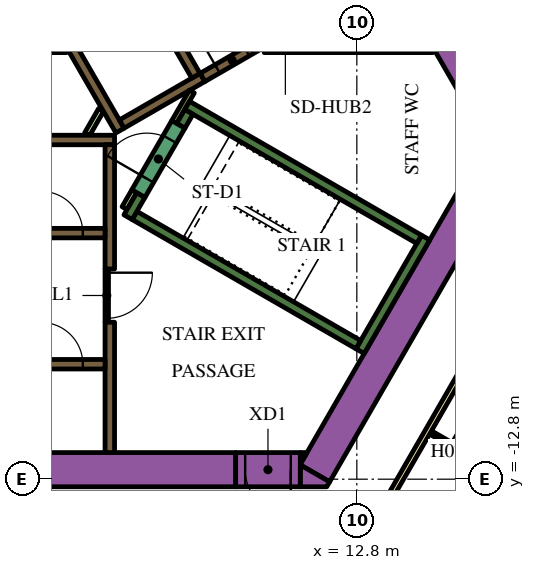
"""IFC4 building model, lengths in metres.
Left out: names, types, materials, properties, quantities, classifications, styles, units other than length and angle.
Written with IfcOpenShell. Run it as: python <this file> out.ifc"""

import sys

from ifc_helpers import new_model, si_unit, direction, frame, frame_2d, origin, place, context, subcontext, project, spatial, polyline, rectangle, outline, extrude, element, fill, save


model = new_model("IFC4")
c1 = context("Model", 3, precision=1e-05, world=origin(), true_north=direction((0.0, 1.0)))
c2 = subcontext(c1, "Body", "Model", "MODEL_VIEW")
j1 = project(units=[si_unit("LENGTHUNIT", "METRE"), si_unit("PLANEANGLEUNIT", "RADIAN")], contexts=[c1])
p1 = place(None, origin())
s1 = spatial("IfcSite", under=j1, at=p1, CompositionType="ELEMENT")
p2 = place(p1, origin())
s2 = spatial("IfcBuilding", under=s1, at=p2, CompositionType="ELEMENT")
p3 = place(p2, frame((0.0, 0.0, 95.4)))
s3 = spatial("IfcBuildingStorey", under=s2, at=p3, CompositionType="ELEMENT", Elevation=95.4)
p4 = place(p3, frame((6.776, 13.364, 0.0), z_axis=(0.0, 0.0, 1.0), x_axis=(0.500004177138, -0.8660229921, 0.0)))
e1 = element("IfcWall", 1, at=p4, inside=s3, PredefinedType="SOLIDWALL", context=c2, shape_type="SweptSolid", body=[
    extrude(rectangle(XDim=20.204, YDim=0.9, at=frame_2d((10.102, 0.0))), origin(), (0.0, 0.0, 1.0), 3.9),
])
p5 = place(p3, frame((11.695, -12.644, 0.0), z_axis=(0.0, 0.0, 1.0), x_axis=(0.500010229568, 0.86601949766, 0.0)))
e2 = element("IfcWall", 2, at=p5, inside=s3, PredefinedType="SOLIDWALL", context=c2, shape_type="SweptSolid", body=[
    extrude(rectangle(XDim=9.326, YDim=0.9, at=frame_2d((4.663, 0.0))), origin(), (0.0, 0.0, 1.0), 3.9),
])
p6 = place(p3, origin())
e3 = element("IfcWall", 3, at=p6, inside=s3, PredefinedType="SOLIDWALL", context=c2, shape_type="SweptSolid", body=[
    extrude(outline(polyline([(12.009, -13.0), (11.312, -13.0), (11.312, -12.425), (12.083, -12.871), (12.009, -13.0)])), origin(), (0.0, 0.0, 1.0), 3.9),
])
e4 = element("IfcWall", 4, at=p6, inside=s3, PredefinedType="SOLIDWALL", context=c2, shape_type="SweptSolid", body=[
    extrude(outline(polyline([(11.489, -12.1), (11.312, -12.407), (11.312, -12.1), (11.489, -12.1)])), origin(), (0.0, 0.0, 1.0), 3.9),
])
p7 = place(p3, frame((-12.019, -12.55, 0.0), z_axis=(0.0, 0.0, 1.0), x_axis=(1.0, 0.0, 0.0)))
e5 = element("IfcWall", 5, at=p7, inside=s3, PredefinedType="SOLIDWALL", context=c2, shape_type="SweptSolid", body=[
    extrude(rectangle(XDim=21.63, YDim=0.9, at=frame_2d((10.815, 0.0))), origin(), (0.0, 0.0, 1.0), 3.9),
])
p8 = place(p3, frame((12.885, -9.431, 0.0), z_axis=(0.0, 0.0, 1.0), x_axis=(0.500020560727, 0.866013532718, 0.0)))
e6 = element("IfcWall", 6, at=p8, inside=s3, PredefinedType="SOLIDWALL", context=c2, shape_type="SweptSolid", body=[
    extrude(rectangle(XDim=3.45, YDim=0.25, at=frame_2d((1.725, 0.0))), origin(), (0.0, 0.0, 1.0), 3.9),
])
p9 = place(p3, frame((12.84, -9.261, 0.0), z_axis=(0.0, 0.0, 1.0), x_axis=(-0.866013990052, 0.500019768644, 0.0)))
e7 = element("IfcWall", 7, at=p9, inside=s3, PredefinedType="SOLIDWALL", context=c2, shape_type="SweptSolid", body=[
    extrude(rectangle(XDim=6.8, YDim=0.25, at=frame_2d((3.4, 0.0))), origin(), (0.0, 0.0, 1.0), 3.9),
])
p10 = place(p3, frame((6.78, -5.906, 0.0), z_axis=(0.0, 0.0, 1.0), x_axis=(0.500223362819, 0.865896406789, 0.0)))
e8 = element("IfcWall", 8, at=p10, inside=s3, PredefinedType="SOLIDWALL", context=c2, shape_type="SweptSolid", body=[
    extrude(rectangle(XDim=0.675, YDim=0.25, at=frame_2d((0.337, 0.0))), origin(), (0.0, 0.0, 1.0), 3.9),
])
p11 = place(p3, frame((8.334, -2.964, 0.0), z_axis=(0.0, 0.0, 1.0), x_axis=(0.866016039709, -0.500016218704, 0.0)))
e9 = element("IfcWall", 9, at=p11, inside=s3, PredefinedType="SOLIDWALL", context=c2, shape_type="SweptSolid", body=[
    extrude(rectangle(XDim=7.05, YDim=0.25, at=frame_2d((3.525, 0.0))), origin(), (0.0, 0.0, 1.0), 3.9),
])
p12 = place(p3, frame((8.168, -3.503, 0.0), z_axis=(0.0, 0.0, 1.0), x_axis=(0.49972245349, 0.866185586049, 0.0)))
e10 = element("IfcWall", 10, at=p12, inside=s3, PredefinedType="SOLIDWALL", context=c2, shape_type="SweptSolid", body=[
    extrude(rectangle(XDim=0.425, YDim=0.25, at=frame_2d((0.212, 0.0))), origin(), (0.0, 0.0, 1.0), 3.9),
])
p13 = place(p3, frame((-5.545, -3.875, 0.0), z_axis=(0.0, 0.0, 1.0), x_axis=(1.0, 0.0, 0.0)))
e11 = element("IfcWall", 11, at=p13, inside=s3, PredefinedType="SOLIDWALL", context=c2, shape_type="SweptSolid", body=[
    extrude(rectangle(XDim=11.97, YDim=0.25, at=frame_2d((5.985, 0.0))), origin(), (0.0, 0.0, 1.0), 3.9),
])
p14 = place(p3, frame((6.3, -8.67, 0.0), z_axis=(0.0, 0.0, 1.0), x_axis=(0.0, -1.0, 0.0)))
e12 = element("IfcWall", 12, at=p14, inside=s3, PredefinedType="SOLIDWALL", context=c2, shape_type="SweptSolid", body=[
    extrude(rectangle(XDim=3.43, YDim=0.25, at=frame_2d((1.715, 0.0))), origin(), (0.0, 0.0, 1.0), 3.9),
])
p15 = place(p3, frame((6.3, -7.268, 0.0), z_axis=(0.0, 0.0, 1.0), x_axis=(0.0, 1.0, 0.0)))
e13 = element("IfcWall", 13, at=p15, inside=s3, PredefinedType="SOLIDWALL", context=c2, shape_type="SweptSolid", body=[
    extrude(rectangle(XDim=3.268, YDim=0.25, at=frame_2d((1.634, 0.0))), origin(), (0.0, 0.0, 1.0), 3.9),
])
e14 = element("IfcWall", 14, at=p6, inside=s3, PredefinedType="SOLIDWALL", context=c2, shape_type="SweptSolid", body=[
    extrude(outline(polyline([(0.566, 6.725), (0.566, 6.875), (0.566, 6.875), (0.565, 6.875), (0.361, 6.875), (0.035, 7.439), (0.252, 7.564), (0.377, 7.348), (6.552, -3.348), (6.677, -3.564), (6.46, -3.689), (0.448, 6.725), (0.565, 6.725), (0.566, 6.725), (0.566, 6.725)])), origin(), (0.0, 0.0, 1.0), 3.9),
])
p16 = place(p3, frame((6.614, -3.456, 0.0), z_axis=(0.0, 0.0, 1.0), x_axis=(0.866031582473, 0.499989298045, 0.0)))
e15 = element("IfcWall", 15, at=p16, inside=s3, PredefinedType="SOLIDWALL", context=c2, shape_type="SweptSolid", body=[
    extrude(rectangle(XDim=2.455, YDim=0.25, at=frame_2d((1.228, 0.0))), origin(), (0.0, 0.0, 1.0), 3.9),
])
p17 = place(p3, frame((6.945, -5.222, 0.0), z_axis=(0.0, 0.0, 1.0), x_axis=(-0.499818422106, -0.866130212453, 0.0)))
e16 = element("IfcWall", 16, at=p17, inside=s3, PredefinedType="PARTITIONING", context=c2, shape_type="SweptSolid", body=[
    extrude(rectangle(XDim=0.514, YDim=0.15, at=frame_2d((0.257, 0.0))), origin(), (0.0, 0.0, 1.0), 2.75),
])
p18 = place(p3, frame((5.705, -3.718, 0.0), z_axis=(0.0, 0.0, 1.0), x_axis=(0.499962090823, 0.866047289552, 0.0)))
e17 = element("IfcWall", 17, at=p18, inside=s3, PredefinedType="PARTITIONING", context=c2, shape_type="SweptSolid", body=[
    extrude(rectangle(XDim=0.735, YDim=0.15, at=frame_2d((0.367, 0.0))), origin(), (0.0, 0.0, 1.0), 2.75),
])
p19 = place(p3, frame((8.459, -2.599, 0.0), z_axis=(0.0, 0.0, 1.0), x_axis=(-0.500041054325, -0.866001699761, 0.0)))
e18 = element("IfcWall", 18, at=p19, inside=s3, PredefinedType="PARTITIONING", context=c2, shape_type="SweptSolid", body=[
    extrude(rectangle(XDim=0.929, YDim=0.15, at=frame_2d((0.464, 0.0))), origin(), (0.0, 0.0, 1.0), 3.9),
])
p20 = place(p3, frame((-6.175, -9.775, 0.0), z_axis=(0.0, 0.0, 1.0), x_axis=(1.0, 0.0, 0.0)))
e19 = element("IfcWall", 19, at=p20, inside=s3, PredefinedType="SOLIDWALL", context=c2, shape_type="SweptSolid", body=[
    extrude(rectangle(XDim=12.35, YDim=0.25, at=frame_2d((6.175, 0.0))), origin(), (0.0, 0.0, 1.0), 3.9),
])
p21 = place(p20, frame((0.585, 0.0, 0.0)))
e20 = element("IfcOpeningElement", 20, at=p21, cuts=e19, PredefinedType="OPENING", context=c2, shape_type="SweptSolid", body=[
    extrude(rectangle(XDim=1.1, YDim=2.1, at=frame_2d((0.55, 1.05))), frame((0.0, 0.135, 0.0), z_axis=(0.0, -1.0, 0.0), x_axis=(1.0, 0.0, 0.0)), (0.0, 0.0, 1.0), 0.27),
])
p22 = place(p20, frame((3.105, 0.0, 0.0)))
e21 = element("IfcOpeningElement", 21, at=p22, cuts=e19, PredefinedType="OPENING", context=c2, shape_type="SweptSolid", body=[
    extrude(rectangle(XDim=1.1, YDim=2.1, at=frame_2d((0.55, 1.05))), frame((0.0, 0.135, 0.0), z_axis=(0.0, -1.0, 0.0), x_axis=(1.0, 0.0, 0.0)), (0.0, 0.0, 1.0), 0.27),
])
p23 = place(p20, frame((5.625, 0.0, 0.0)))
e22 = element("IfcOpeningElement", 22, at=p23, cuts=e19, PredefinedType="OPENING", context=c2, shape_type="SweptSolid", body=[
    extrude(rectangle(XDim=1.1, YDim=2.1, at=frame_2d((0.55, 1.05))), frame((0.0, 0.135, 0.0), z_axis=(0.0, -1.0, 0.0), x_axis=(1.0, 0.0, 0.0)), (0.0, 0.0, 1.0), 0.27),
])
p24 = place(p20, frame((8.145, 0.0, 0.0)))
e23 = element("IfcOpeningElement", 23, at=p24, cuts=e19, PredefinedType="OPENING", context=c2, shape_type="SweptSolid", body=[
    extrude(rectangle(XDim=1.1, YDim=2.1, at=frame_2d((0.55, 1.05))), frame((0.0, 0.135, 0.0), z_axis=(0.0, -1.0, 0.0), x_axis=(1.0, 0.0, 0.0)), (0.0, 0.0, 1.0), 0.27),
])
p25 = place(p20, frame((10.665, 0.0, 0.0)))
e24 = element("IfcOpeningElement", 24, at=p25, cuts=e19, PredefinedType="OPENING", context=c2, shape_type="SweptSolid", body=[
    extrude(rectangle(XDim=1.1, YDim=2.1, at=frame_2d((0.55, 1.05))), frame((0.0, 0.135, 0.0), z_axis=(0.0, -1.0, 0.0), x_axis=(1.0, 0.0, 0.0)), (0.0, 0.0, 1.0), 0.27),
])
p26 = place(p3, frame((-6.175, -6.325, 0.0), z_axis=(0.0, 0.0, 1.0), x_axis=(1.0, 0.0, 0.0)))
e25 = element("IfcWall", 25, at=p26, inside=s3, PredefinedType="SOLIDWALL", context=c2, shape_type="SweptSolid", body=[
    extrude(rectangle(XDim=12.35, YDim=0.25, at=frame_2d((6.175, 0.0))), origin(), (0.0, 0.0, 1.0), 3.9),
])
p27 = place(p26, frame((3.205, 0.0, 0.0)))
e26 = element("IfcOpeningElement", 26, at=p27, cuts=e25, PredefinedType="OPENING", context=c2, shape_type="SweptSolid", body=[
    extrude(rectangle(XDim=0.9, YDim=2.1, at=frame_2d((0.45, 1.05))), frame((0.0, 0.135, 0.0), z_axis=(0.0, -1.0, 0.0), x_axis=(1.0, 0.0, 0.0)), (0.0, 0.0, 1.0), 0.27),
])
p28 = place(p26, frame((8.145, 0.0, 0.0)))
e27 = element("IfcOpeningElement", 27, at=p28, cuts=e25, PredefinedType="OPENING", context=c2, shape_type="SweptSolid", body=[
    extrude(rectangle(XDim=1.1, YDim=2.1, at=frame_2d((0.55, 1.05))), frame((0.0, 0.135, 0.0), z_axis=(0.0, -1.0, 0.0), x_axis=(1.0, 0.0, 0.0)), (0.0, 0.0, 1.0), 0.27),
])
p29 = place(p26, frame((10.665, 0.0, 0.0)))
e28 = element("IfcOpeningElement", 28, at=p29, cuts=e25, PredefinedType="OPENING", context=c2, shape_type="SweptSolid", body=[
    extrude(rectangle(XDim=1.1, YDim=2.1, at=frame_2d((0.55, 1.05))), frame((0.0, 0.135, 0.0), z_axis=(0.0, -1.0, 0.0), x_axis=(1.0, 0.0, 0.0)), (0.0, 0.0, 1.0), 0.27),
])
p30 = place(p3, frame((8.565, -2.185, 0.0), z_axis=(0.0, 0.0, 1.0), x_axis=(-0.499997954832, 0.866026584559, 0.0)))
e29 = element("IfcWall", 29, at=p30, inside=s3, PredefinedType="SOLIDWALL", context=c2, shape_type="SweptSolid", body=[
    extrude(rectangle(XDim=12.35, YDim=0.25, at=frame_2d((6.175, 0.0))), origin(), (0.0, 0.0, 1.0), 3.9),
])
p31 = place(p30, frame((5.725, 0.0, 0.0)))
e30 = element("IfcOpeningElement", 30, at=p31, cuts=e29, PredefinedType="OPENING", context=c2, shape_type="SweptSolid", body=[
    extrude(rectangle(XDim=0.9, YDim=2.1, at=frame_2d((0.45, 1.05))), frame((0.0, 0.135, 0.0), z_axis=(0.0, -1.0, 0.0), x_axis=(1.0, 0.0, 0.0)), (0.0, 0.0, 1.0), 0.27),
])
p32 = place(p3, frame((7.053, -5.284, 0.0), z_axis=(0.0, 0.0, 1.0), x_axis=(0.500078061341, 0.865980330357, 0.0)))
e31 = element("IfcWall", 31, at=p32, inside=s3, PredefinedType="SOLIDWALL", context=c2, shape_type="SweptSolid", body=[
    extrude(rectangle(XDim=2.1, YDim=0.4, at=frame_2d((1.05, 0.0))), origin(), (0.0, 0.0, 1.0), 3.9),
])
p33 = place(p32, frame((0.45, 0.0, 0.0)))
e32 = element("IfcOpeningElement", 32, at=p33, cuts=e31, PredefinedType="OPENING", context=c2, shape_type="SweptSolid", body=[
    extrude(rectangle(XDim=1.2, YDim=2.1, at=frame_2d((0.6, 1.05))), frame((0.0, 0.21, 0.0), z_axis=(0.0, -1.0, 0.0), x_axis=(1.0, 0.0, 0.0)), (0.0, 0.0, 1.0), 0.42),
])
p34 = place(p3, frame((8.74, -2.229, 0.0), z_axis=(0.0, 0.0, 1.0), x_axis=(0.865989075817, 0.500062916607, 0.0)))
e33 = element("IfcWall", 33, at=p34, inside=s3, PredefinedType="SOLIDWALL", context=c2, shape_type="SweptSolid", body=[
    extrude(rectangle(XDim=1.8, YDim=0.25, at=frame_2d((0.9, 0.0))), origin(), (0.0, 0.0, 1.0), 3.9),
])
p35 = place(p34, frame((0.45, 0.0, 0.0)))
e34 = element("IfcOpeningElement", 34, at=p35, cuts=e33, PredefinedType="OPENING", context=c2, shape_type="SweptSolid", body=[
    extrude(rectangle(XDim=0.9, YDim=2.1, at=frame_2d((0.45, 1.05))), frame((0.0, 0.135, 0.0), z_axis=(0.0, -1.0, 0.0), x_axis=(1.0, 0.0, 0.0)), (0.0, 0.0, 1.0), 0.27),
])
p36 = place(p3, frame((6.22, -7.266, 0.0), z_axis=(0.0, 0.0, 1.0), x_axis=(0.0, -1.0, 0.0)))
e35 = element("IfcWall", 35, at=p36, inside=s3, PredefinedType="PARTITIONING", context=c2, shape_type="SweptSolid", body=[
    extrude(rectangle(XDim=1.4, YDim=0.09, at=frame_2d((0.7, 0.0))), origin(), (0.0, 0.0, 1.0), 2.75),
])
p37 = place(p36, frame((0.1, 0.0, 0.0)))
e36 = element("IfcOpeningElement", 36, at=p37, cuts=e35, PredefinedType="OPENING", context=c2, shape_type="SweptSolid", body=[
    extrude(rectangle(XDim=1.2, YDim=2.1, at=frame_2d((0.6, 1.05))), frame((0.0, 0.055, 0.0), z_axis=(0.0, -1.0, 0.0), x_axis=(1.0, 0.0, 0.0)), (0.0, 0.0, 1.0), 0.11),
])
p38 = place(p3, frame((11.312, -12.55, 0.0), z_axis=(0.0, 0.0, 1.0), x_axis=(-1.0, 0.0, 0.0)))
e37 = element("IfcWall", 37, at=p38, inside=s3, PredefinedType="SOLIDWALL", context=c2, shape_type="SweptSolid", body=[
    extrude(rectangle(XDim=1.7, YDim=0.9, at=frame_2d((0.85, 0.0))), origin(), (0.0, 0.0, 1.0), 3.9),
])
p39 = place(p38, frame((0.25, 0.0, 0.0)))
e38 = element("IfcOpeningElement", 38, at=p39, cuts=e37, PredefinedType="OPENING", context=c2, shape_type="SweptSolid", body=[
    extrude(rectangle(XDim=1.2, YDim=2.1, at=frame_2d((0.6, 1.05))), frame((0.0, 0.46, 0.0), z_axis=(0.0, -1.0, 0.0), x_axis=(1.0, 0.0, 0.0)), (0.0, 0.0, 1.0), 0.92),
])
p40 = place(p3, frame((6.163, 18.475, 0.0), z_axis=(0.0, 0.0, 1.0), x_axis=(0.500001317485, -0.866024643133, 0.0)))
e39 = element("IfcWall", 39, at=p40, inside=s3, PredefinedType="PARTITIONING", context=c2, shape_type="SweptSolid", body=[
    extrude(rectangle(XDim=25.767, YDim=0.15, at=frame_2d((12.883, 0.0))), origin(), (0.0, 0.0, 1.0), 2.75),
])
p41 = place(p40, frame((24.241, 0.0, 0.0)))
e40 = element("IfcOpeningElement", 40, at=p41, cuts=e39, PredefinedType="OPENING", context=c2, shape_type="SweptSolid", body=[
    extrude(rectangle(XDim=1.0, YDim=2.1, at=frame_2d((0.5, 1.05))), frame((0.0, 0.085, 0.0), z_axis=(0.0, -1.0, 0.0), x_axis=(1.0, 0.0, 0.0)), (0.0, 0.0, 1.0), 0.17),
])
p42 = place(p40, frame((13.144, 0.0, 0.0)))
e41 = element("IfcOpeningElement", 41, at=p42, cuts=e39, PredefinedType="OPENING", context=c2, shape_type="SweptSolid", body=[
    extrude(rectangle(XDim=1.0, YDim=2.1, at=frame_2d((0.5, 1.05))), frame((0.0, 0.085, 0.0), z_axis=(0.0, -1.0, 0.0), x_axis=(1.0, 0.0, 0.0)), (0.0, 0.0, 1.0), 0.17),
])
p43 = place(p40, frame((11.592, 0.0, 0.0)))
e42 = element("IfcOpeningElement", 42, at=p43, cuts=e39, PredefinedType="OPENING", context=c2, shape_type="SweptSolid", body=[
    extrude(rectangle(XDim=1.1, YDim=2.1, at=frame_2d((0.55, 1.05))), frame((0.0, 0.085, 0.0), z_axis=(0.0, -1.0, 0.0), x_axis=(1.0, 0.0, 0.0)), (0.0, 0.0, 1.0), 0.17),
])
p44 = place(p40, frame((4.674, 0.0, 0.0)))
e43 = element("IfcOpeningElement", 43, at=p44, cuts=e39, PredefinedType="OPENING", context=c2, shape_type="SweptSolid", body=[
    extrude(rectangle(XDim=0.9, YDim=2.1, at=frame_2d((0.45, 1.05))), frame((0.0, 0.085, 0.0), z_axis=(0.0, -1.0, 0.0), x_axis=(1.0, 0.0, 0.0)), (0.0, 0.0, 1.0), 0.17),
])
p45 = place(p40, frame((2.411, 0.0, 0.0)))
e44 = element("IfcOpeningElement", 44, at=p45, cuts=e39, PredefinedType="OPENING", context=c2, shape_type="SweptSolid", body=[
    extrude(rectangle(XDim=1.0, YDim=2.1, at=frame_2d((0.5, 1.05))), frame((0.0, 0.085, 0.0), z_axis=(0.0, -1.0, 0.0), x_axis=(1.0, 0.0, 0.0)), (0.0, 0.0, 1.0), 0.17),
])
p46 = place(p3, frame((15.587, -9.952, 0.0), z_axis=(0.0, 0.0, 1.0), x_axis=(-0.500016618951, -0.866015808616, 0.0)))
e45 = element("IfcWall", 45, at=p46, inside=s3, PredefinedType="PARTITIONING", context=c2, shape_type="SweptSolid", body=[
    extrude(rectangle(XDim=5.268, YDim=0.15, at=frame_2d((2.634, 0.0))), origin(), (0.0, 0.0, 1.0), 2.75),
])
p47 = place(p46, frame((4.088, 0.0, 0.0)))
e46 = element("IfcOpeningElement", 46, at=p47, cuts=e45, PredefinedType="OPENING", context=c2, shape_type="SweptSolid", body=[
    extrude(rectangle(XDim=1.0, YDim=2.1, at=frame_2d((0.5, 1.05))), frame((0.0, 0.085, 0.0), z_axis=(0.0, -1.0, 0.0), x_axis=(1.0, 0.0, 0.0)), (0.0, 0.0, 1.0), 0.17),
])
p48 = place(p3, frame((14.74, -11.57, 0.0), z_axis=(0.0, 0.0, 1.0), x_axis=(0.866021400173, -0.500006934395, 0.0)))
e47 = element("IfcWall", 47, at=p48, inside=s3, PredefinedType="PARTITIONING", context=c2, shape_type="SweptSolid", body=[
    extrude(rectangle(XDim=2.6, YDim=0.1, at=frame_2d((1.3, 0.0))), origin(), (0.0, 0.0, 1.0), 2.75),
])
p49 = place(p48, frame((0.6, 0.0, 0.0)))
e48 = element("IfcOpeningElement", 48, at=p49, cuts=e47, PredefinedType="OPENING", context=c2, shape_type="SweptSolid", body=[
    extrude(rectangle(XDim=0.9, YDim=2.1, at=frame_2d((0.45, 1.05))), frame((0.0, 0.06, 0.0), z_axis=(0.0, -1.0, 0.0), x_axis=(1.0, 0.0, 0.0)), (0.0, 0.0, 1.0), 0.12),
])
p50 = place(p25, origin())
e49 = element("IfcDoor", 49, at=p50, inside=s3, OperationType="DOUBLE_DOOR_SLIDING", PredefinedType="DOOR", context=c2, shape_type="SweptSolid", body=[
    extrude(rectangle(XDim=1.1, YDim=2.1, at=frame_2d((0.55, 1.05))), frame((0.0, 0.025, 0.0), z_axis=(0.0, -1.0, 0.0), x_axis=(1.0, 0.0, 0.0)), (0.0, 0.0, 1.0), 0.05),
])
fill(e24, e49)
p51 = place(p29, origin())
e50 = element("IfcDoor", 50, at=p51, inside=s3, OperationType="DOUBLE_DOOR_SLIDING", PredefinedType="DOOR", context=c2, shape_type="SweptSolid", body=[
    extrude(rectangle(XDim=1.1, YDim=2.1, at=frame_2d((0.55, 1.05))), frame((0.0, 0.025, 0.0), z_axis=(0.0, -1.0, 0.0), x_axis=(1.0, 0.0, 0.0)), (0.0, 0.0, 1.0), 0.05),
])
fill(e28, e50)
p52 = place(p33, origin())
e51 = element("IfcDoor", 51, at=p52, inside=s3, OperationType="SINGLE_SWING_LEFT", PredefinedType="DOOR", context=c2, shape_type="SweptSolid", body=[
    extrude(rectangle(XDim=1.2, YDim=2.1, at=frame_2d((0.6, 1.05))), frame((0.0, 0.025, 0.0), z_axis=(0.0, -1.0, 0.0), x_axis=(1.0, 0.0, 0.0)), (0.0, 0.0, 1.0), 0.05),
])
fill(e32, e51)
p53 = place(p35, origin())
e52 = element("IfcDoor", 52, at=p53, inside=s3, OperationType="SINGLE_SWING_LEFT", PredefinedType="DOOR", context=c2, shape_type="SweptSolid", body=[
    extrude(rectangle(XDim=0.9, YDim=2.1, at=frame_2d((0.45, 1.05))), frame((0.0, 0.025, 0.0), z_axis=(0.0, -1.0, 0.0), x_axis=(1.0, 0.0, 0.0)), (0.0, 0.0, 1.0), 0.05),
])
fill(e34, e52)
p54 = place(p37, origin())
e53 = element("IfcDoor", 53, at=p54, inside=s3, OperationType="SINGLE_SWING_LEFT", PredefinedType="DOOR", context=c2, shape_type="SweptSolid", body=[
    extrude(rectangle(XDim=1.2, YDim=2.1, at=frame_2d((0.6, 1.05))), frame((0.0, 0.025, 0.0), z_axis=(0.0, -1.0, 0.0), x_axis=(1.0, 0.0, 0.0)), (0.0, 0.0, 1.0), 0.05),
])
fill(e36, e53)
p55 = place(p39, origin())
e54 = element("IfcDoor", 54, at=p55, inside=s3, OperationType="SINGLE_SWING_LEFT", PredefinedType="DOOR", context=c2, shape_type="SweptSolid", body=[
    extrude(rectangle(XDim=1.2, YDim=2.1, at=frame_2d((0.6, 1.05))), frame((0.0, 0.025, 0.0), z_axis=(0.0, -1.0, 0.0), x_axis=(1.0, 0.0, 0.0)), (0.0, 0.0, 1.0), 0.05),
])
fill(e38, e54)
p56 = place(p49, origin())
e55 = element("IfcDoor", 55, at=p56, inside=s3, OperationType="SINGLE_SWING_LEFT", PredefinedType="DOOR", context=c2, shape_type="SweptSolid", body=[
    extrude(rectangle(XDim=0.9, YDim=2.1, at=frame_2d((0.45, 1.05))), frame((0.0, 0.025, 0.0), z_axis=(0.0, -1.0, 0.0), x_axis=(1.0, 0.0, 0.0)), (0.0, 0.0, 1.0), 0.05),
])
fill(e48, e55)
save(model, sys.argv[1])
